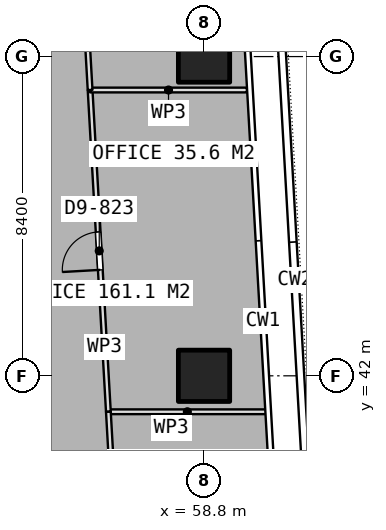
"""IFC4 building model, lengths in metres.
Left out: names, types, materials, properties, quantities, classifications, styles, units other than length and angle.
Written with IfcOpenShell. Run it as: python <this file> out.ifc"""

import sys

from ifc_helpers import new_model, si_unit, direction, frame, frame_2d, origin, origin_2d, place, context, subcontext, project, spatial, rectangle, extrude, element, fill, save


model = new_model("IFC4")
c1 = context("Model", 3, precision=1e-05, world=origin(), true_north=direction((0.0, 1.0)))
c2 = subcontext(c1, "Body", "Model", "MODEL_VIEW")
j1 = project(units=[si_unit("LENGTHUNIT", "METRE"), si_unit("PLANEANGLEUNIT", "RADIAN")], contexts=[c1])
p1 = place(None, origin())
s1 = spatial("IfcSite", under=j1, at=p1, CompositionType="ELEMENT")
p2 = place(p1, origin())
s2 = spatial("IfcBuilding", under=s1, at=p2, CompositionType="ELEMENT")
p3 = place(p2, frame((0.0, 0.0, 202.7)))
s3 = spatial("IfcBuildingStorey", under=s2, at=p3, CompositionType="ELEMENT", Elevation=202.7)
for number, where, z_axis, x_axis in (
    (1, (58.8, 42.0, 0.0), (0.0, 0.0, 1.0), (1.0, 0.0, 0.0)),
    (2, (58.8, 50.4, 0.0), (0.0, 0.0, 1.0), (1.0, 0.0, 0.0)),
):
    element("IfcColumn", number, at=place(p3, frame(where, z_axis=z_axis, x_axis=x_axis)), inside=s3, PredefinedType="COLUMN", context=c2, shape_type="SweptSolid", body=[
        extrude(rectangle(XDim=1.35, YDim=1.35, at=origin_2d()), origin(), (0.0, 0.0, 1.0), 3.75),
    ])
p4 = place(p3, frame((56.658, 34.434, 0.0), z_axis=(0.0, 0.0, 1.0), x_axis=(-0.056556940453, 0.998399375244, 0.0)))
e3 = element("IfcWall", 3, at=p4, inside=s3, PredefinedType="PARTITIONING", context=c2, shape_type="SweptSolid", body=[
    extrude(rectangle(XDim=6.63, YDim=0.125, at=frame_2d((3.315, 0.0))), origin(), (0.0, 0.0, 1.0), 3.5),
])
p5 = place(p4, frame((2.815, 0.0, 0.0)))
e4 = element("IfcOpeningElement", 4, at=p5, cuts=e3, PredefinedType="OPENING", context=c2, shape_type="SweptSolid", body=[
    extrude(rectangle(XDim=1.0, YDim=2.1, at=frame_2d((0.5, 1.05))), frame((0.0, 0.073, 0.0), z_axis=(0.0, -1.0, 0.0), x_axis=(1.0, 0.0, 0.0)), (0.0, 0.0, 1.0), 0.145),
])
p6 = place(p3, frame((56.283, 41.054, 0.0), z_axis=(0.0, 0.0, 1.0), x_axis=(1.0, 0.0, 0.0)))
e5 = element("IfcWall", 5, at=p6, inside=s3, PredefinedType="PARTITIONING", context=c2, shape_type="SweptSolid", body=[
    extrude(rectangle(XDim=4.156, YDim=0.125, at=frame_2d((2.078, 0.0))), origin(), (0.0, 0.0, 1.0), 3.5),
])
p7 = place(p3, frame((56.283, 41.055, 0.0), z_axis=(0.0, 0.0, 1.0), x_axis=(-0.056725059265, 0.998389837514, 0.0)))
e6 = element("IfcWall", 6, at=p7, inside=s3, PredefinedType="PARTITIONING", context=c2, shape_type="SweptSolid", body=[
    extrude(rectangle(XDim=8.479, YDim=0.125, at=frame_2d((4.239, 0.0))), origin(), (0.0, 0.0, 1.0), 3.5),
])
p8 = place(p7, frame((3.739, 0.0, 0.0)))
e7 = element("IfcOpeningElement", 7, at=p8, cuts=e6, PredefinedType="OPENING", context=c2, shape_type="SweptSolid", body=[
    extrude(rectangle(XDim=1.0, YDim=2.1, at=frame_2d((0.5, 1.05))), frame((0.0, 0.073, 0.0), z_axis=(0.0, -1.0, 0.0), x_axis=(1.0, 0.0, 0.0)), (0.0, 0.0, 1.0), 0.145),
])
p9 = place(p3, frame((55.802, 49.52, 0.0), z_axis=(0.0, 0.0, 1.0), x_axis=(1.0, 0.0, 0.0)))
e8 = element("IfcWall", 8, at=p9, inside=s3, PredefinedType="PARTITIONING", context=c2, shape_type="SweptSolid", body=[
    extrude(rectangle(XDim=4.127, YDim=0.125, at=frame_2d((2.063, 0.0))), origin(), (0.0, 0.0, 1.0), 3.5),
])
p10 = place(p3, frame((55.802, 49.521, 0.0), z_axis=(0.0, 0.0, 1.0), x_axis=(-0.056623192548, 0.998395620015, 0.0)))
e9 = element("IfcWall", 9, at=p10, inside=s3, PredefinedType="PARTITIONING", context=c2, shape_type="SweptSolid", body=[
    extrude(rectangle(XDim=7.188, YDim=0.125, at=frame_2d((3.594, 0.0))), origin(), (0.0, 0.0, 1.0), 3.5),
])
p11 = place(p10, frame((3.094, 0.0, 0.0)))
e10 = element("IfcOpeningElement", 10, at=p11, cuts=e9, PredefinedType="OPENING", context=c2, shape_type="SweptSolid", body=[
    extrude(rectangle(XDim=1.0, YDim=2.1, at=frame_2d((0.5, 1.05))), frame((0.0, 0.073, 0.0), z_axis=(0.0, -1.0, 0.0), x_axis=(1.0, 0.0, 0.0)), (0.0, 0.0, 1.0), 0.145),
])
p12 = place(p8, origin())
e11 = element("IfcDoor", 11, at=p12, inside=s3, OperationType="SINGLE_SWING_LEFT", PredefinedType="DOOR", context=c2, shape_type="SweptSolid", body=[
    extrude(rectangle(XDim=1.0, YDim=2.1, at=frame_2d((0.5, 1.05))), frame((0.0, 0.025, 0.0), z_axis=(0.0, -1.0, 0.0), x_axis=(1.0, 0.0, 0.0)), (0.0, 0.0, 1.0), 0.05),
])
fill(e7, e11)
save(model, sys.argv[1])
